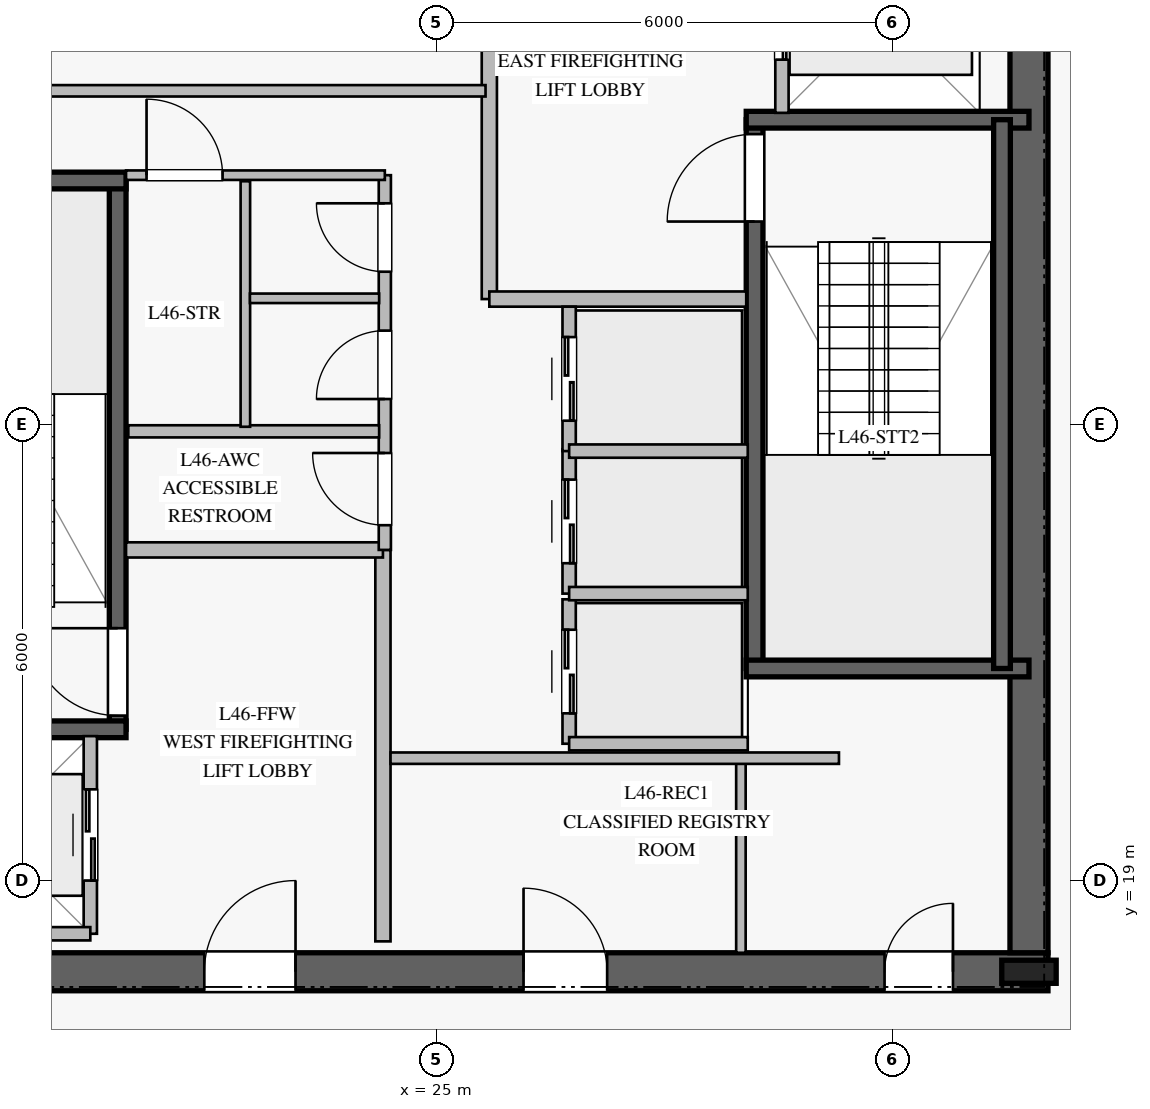
"""IFC4 building model, lengths in metres.
Left out: names, types, materials, properties, quantities, classifications, styles, units other than length and angle.
Written with IfcOpenShell. Run it as: python <this file> out.ifc"""

import sys

from ifc_helpers import new_model, si_unit, direction, frame, frame_2d, origin, origin_2d, place, context, subcontext, project, spatial, rectangle, i_section, extrude, element, fill, save


model = new_model("IFC4")
c1 = context("Model", 3, precision=1e-05, world=origin(), true_north=direction((0.0, 1.0)))
c2 = subcontext(c1, "Body", "Model", "MODEL_VIEW")
j1 = project(units=[si_unit("LENGTHUNIT", "METRE"), si_unit("PLANEANGLEUNIT", "RADIAN")], contexts=[c1])
p1 = place(None, origin())
s1 = spatial("IfcSite", under=j1, at=p1, CompositionType="ELEMENT")
p2 = place(p1, origin())
s2 = spatial("IfcBuilding", under=s1, at=p2, CompositionType="ELEMENT")
p3 = place(p2, frame((0.0, 0.0, 192.8)))
s3 = spatial("IfcBuildingStorey", under=s2, at=p3, CompositionType="ELEMENT", Elevation=192.8)
p4 = place(p3, frame((16.95, 17.8, 0.0), z_axis=(0.0, 0.0, 1.0), x_axis=(1.0, 0.0, 0.0)))
e1 = element("IfcWall", 1, at=p4, inside=s3, PredefinedType="SHEAR", context=c2, shape_type="SweptSolid", body=[
    extrude(rectangle(XDim=16.1, YDim=0.5, at=frame_2d((8.05, 0.0))), origin(), (0.0, 0.0, 1.0), 3.78),
])
p5 = place(p4, frame((5.0, 0.0, 0.0)))
e2 = element("IfcOpeningElement", 2, at=p5, cuts=e1, PredefinedType="OPENING", context=c2, shape_type="SweptSolid", body=[
    extrude(rectangle(XDim=1.2, YDim=2.25, at=frame_2d((0.6, 1.125))), frame((0.0, 0.26, 0.0), z_axis=(0.0, -1.0, 0.0), x_axis=(1.0, 0.0, 0.0)), (0.0, 0.0, 1.0), 0.52),
])
p6 = place(p4, frame((13.95, 0.0, 0.0)))
e3 = element("IfcOpeningElement", 3, at=p6, cuts=e1, PredefinedType="OPENING", context=c2, shape_type="SweptSolid", body=[
    extrude(rectangle(XDim=0.9, YDim=2.1, at=frame_2d((0.45, 1.05))), frame((0.0, 0.26, 0.0), z_axis=(0.0, -1.0, 0.0), x_axis=(1.0, 0.0, 0.0)), (0.0, 0.0, 1.0), 0.52),
])
p7 = place(p4, frame((9.2, 0.0, 0.0)))
e4 = element("IfcOpeningElement", 4, at=p7, cuts=e1, PredefinedType="OPENING", context=c2, shape_type="SweptSolid", body=[
    extrude(rectangle(XDim=1.1, YDim=2.2, at=frame_2d((0.55, 1.1))), frame((0.0, 0.26, 0.0), z_axis=(0.0, -1.0, 0.0), x_axis=(1.0, 0.0, 0.0)), (0.0, 0.0, 1.0), 0.52),
])
p8 = place(p3, frame((32.8, 18.05, 0.0), z_axis=(0.0, 0.0, 1.0), x_axis=(0.0, 1.0, 0.0)))
e5 = element("IfcWall", 5, at=p8, inside=s3, PredefinedType="SHEAR", context=c2, shape_type="SweptSolid", body=[
    extrude(rectangle(XDim=13.9, YDim=0.5, at=frame_2d((6.95, 0.0))), origin(), (0.0, 0.0, 1.0), 3.78),
])
p9 = place(p3, frame((32.8, 17.8, 0.0), z_axis=(0.0, 0.0, 1.0), x_axis=(1.0, 0.0, 0.0)))
e6 = element("IfcColumn", 6, at=p9, inside=s3, PredefinedType="COLUMN", context=c2, shape_type="SweptSolid", body=[
    extrude(i_section(OverallWidth=0.304, OverallDepth=0.716, WebThickness=0.021, FlangeThickness=0.04, at=origin_2d()), origin(), (0.0, 0.0, 1.0), 4.0),
])
p10 = place(p3, frame((20.81, 20.99, 0.0), z_axis=(0.0, 0.0, 1.0), x_axis=(0.0, 1.0, 0.0)))
e7 = element("IfcWall", 7, at=p10, inside=s3, PredefinedType="SOLIDWALL", context=c2, shape_type="SweptSolid", body=[
    extrude(rectangle(XDim=7.22, YDim=0.22, at=frame_2d((3.61, 0.0))), origin(), (0.0, 0.0, 1.0), 3.78),
])
p11 = place(p10, frame((0.18, 0.0, 0.0)))
e8 = element("IfcOpeningElement", 8, at=p11, cuts=e7, PredefinedType="OPENING", context=c2, shape_type="SweptSolid", body=[
    extrude(rectangle(XDim=1.15, YDim=2.2, at=frame_2d((0.575, 1.1))), frame((0.0, 0.12, 0.0), z_axis=(0.0, -1.0, 0.0), x_axis=(1.0, 0.0, 0.0)), (0.0, 0.0, 1.0), 0.24),
])
for number, where, z_axis, x_axis in (
    (9, (17.2, 20.99, 0.0), (0.0, 0.0, 1.0), (1.0, 0.0, 0.0)),
    (10, (17.2, 28.21, 0.0), (0.0, 0.0, 1.0), (1.0, 0.0, 0.0)),
):
    element("IfcWall", number, at=place(p3, frame(where, z_axis=z_axis, x_axis=x_axis)), inside=s3, PredefinedType="SOLIDWALL", context=c2, shape_type="SweptSolid", body=[
        extrude(rectangle(XDim=3.72, YDim=0.22, at=frame_2d((1.86, 0.0))), origin(), (0.0, 0.0, 1.0), 3.78),
    ])
p12 = place(p3, frame((29.19, 21.79, 0.0), z_axis=(0.0, 0.0, 1.0), x_axis=(0.0, 1.0, 0.0)))
e11 = element("IfcWall", 11, at=p12, inside=s3, PredefinedType="SOLIDWALL", context=c2, shape_type="SweptSolid", body=[
    extrude(rectangle(XDim=7.22, YDim=0.22, at=frame_2d((3.61, 0.0))), origin(), (0.0, 0.0, 1.0), 3.78),
])
p13 = place(p12, frame((5.88, 0.0, 0.0)))
e12 = element("IfcOpeningElement", 12, at=p13, cuts=e11, PredefinedType="OPENING", context=c2, shape_type="SweptSolid", body=[
    extrude(rectangle(XDim=1.15, YDim=2.2, at=frame_2d((0.575, 1.1))), frame((0.0, 0.12, 0.0), z_axis=(0.0, -1.0, 0.0), x_axis=(1.0, 0.0, 0.0)), (0.0, 0.0, 1.0), 0.24),
])
for number, where, z_axis, x_axis in (
    (13, (29.08, 21.79, 0.0), (0.0, 0.0, 1.0), (1.0, 0.0, 0.0)),
    (14, (29.08, 29.01, 0.0), (0.0, 0.0, 1.0), (1.0, 0.0, 0.0)),
):
    element("IfcWall", number, at=place(p3, frame(where, z_axis=z_axis, x_axis=x_axis)), inside=s3, PredefinedType="SOLIDWALL", context=c2, shape_type="SweptSolid", body=[
        extrude(rectangle(XDim=3.72, YDim=0.22, at=frame_2d((1.86, 0.0))), origin(), (0.0, 0.0, 1.0), 3.78),
    ])
p14 = place(p3, frame((32.445, 29.01, 0.0), z_axis=(0.0, 0.0, 1.0), x_axis=(0.0, -1.0, 0.0)))
e15 = element("IfcWall", 15, at=p14, inside=s3, PredefinedType="SOLIDWALL", context=c2, shape_type="SweptSolid", body=[
    extrude(rectangle(XDim=7.22, YDim=0.22, at=frame_2d((3.61, 0.0))), origin(), (0.0, 0.0, 1.0), 3.78),
])
p15 = place(p3, frame((24.3, 18.2, 0.0), z_axis=(0.0, 0.0, 1.0), x_axis=(0.0, 1.0, 0.0)))
e16 = element("IfcWall", 16, at=p15, inside=s3, PredefinedType="PARTITIONING", context=c2, shape_type="SweptSolid", body=[
    extrude(rectangle(XDim=5.15, YDim=0.2, at=frame_2d((2.575, 0.0))), origin(), (0.0, 0.0, 1.0), 3.78),
])
p16 = place(p3, frame((20.92, 23.35, 0.0), z_axis=(0.0, 0.0, 1.0), x_axis=(1.0, 0.0, 0.0)))
e17 = element("IfcWall", 17, at=p16, inside=s3, PredefinedType="PARTITIONING", context=c2, shape_type="SweptSolid", body=[
    extrude(rectangle(XDim=3.38, YDim=0.2, at=frame_2d((1.69, 0.0))), origin(), (0.0, 0.0, 1.0), 3.78),
])
p17 = place(p3, frame((25.7, 26.65, 0.0), z_axis=(0.0, 0.0, 1.0), x_axis=(0.0, 1.0, 0.0)))
e18 = element("IfcWall", 18, at=p17, inside=s3, PredefinedType="PARTITIONING", context=c2, shape_type="SweptSolid", body=[
    extrude(rectangle(XDim=5.15, YDim=0.2, at=frame_2d((2.575, 0.0))), origin(), (0.0, 0.0, 1.0), 3.78),
])
p18 = place(p3, frame((25.7, 26.65, 0.0), z_axis=(0.0, 0.0, 1.0), x_axis=(1.0, 0.0, 0.0)))
e19 = element("IfcWall", 19, at=p18, inside=s3, PredefinedType="PARTITIONING", context=c2, shape_type="SweptSolid", body=[
    extrude(rectangle(XDim=3.38, YDim=0.2, at=frame_2d((1.69, 0.0))), origin(), (0.0, 0.0, 1.0), 3.78),
])
p19 = place(p3, frame((24.325, 23.35, 0.0), z_axis=(0.0, 0.0, 1.0), x_axis=(0.0, 1.0, 0.0)))
e20 = element("IfcWall", 20, at=p19, inside=s3, PredefinedType="PLUMBINGWALL", context=c2, shape_type="SweptSolid", body=[
    extrude(rectangle(XDim=4.93, YDim=0.16, at=frame_2d((2.465, 0.0))), origin(), (0.0, 0.0, 1.0), 3.78),
])
p20 = place(p19, frame((0.325, 0.0, 0.0)))
e21 = element("IfcOpeningElement", 21, at=p20, cuts=e20, PredefinedType="OPENING", context=c2, shape_type="SweptSolid", body=[
    extrude(rectangle(XDim=0.95, YDim=2.1, at=frame_2d((0.475, 1.05))), frame((0.0, 0.09, 0.0), z_axis=(0.0, -1.0, 0.0), x_axis=(1.0, 0.0, 0.0)), (0.0, 0.0, 1.0), 0.18),
])
p21 = place(p19, frame((1.985, 0.0, 0.0)))
e22 = element("IfcOpeningElement", 22, at=p21, cuts=e20, PredefinedType="OPENING", context=c2, shape_type="SweptSolid", body=[
    extrude(rectangle(XDim=0.9, YDim=2.1, at=frame_2d((0.45, 1.05))), frame((0.0, 0.09, 0.0), z_axis=(0.0, -1.0, 0.0), x_axis=(1.0, 0.0, 0.0)), (0.0, 0.0, 1.0), 0.18),
])
p22 = place(p19, frame((3.66, 0.0, 0.0)))
e23 = element("IfcOpeningElement", 23, at=p22, cuts=e20, PredefinedType="OPENING", context=c2, shape_type="SweptSolid", body=[
    extrude(rectangle(XDim=0.9, YDim=2.1, at=frame_2d((0.45, 1.05))), frame((0.0, 0.09, 0.0), z_axis=(0.0, -1.0, 0.0), x_axis=(1.0, 0.0, 0.0)), (0.0, 0.0, 1.0), 0.18),
])
p23 = place(p3, frame((20.92, 28.28, 0.0), z_axis=(0.0, 0.0, 1.0), x_axis=(1.0, 0.0, 0.0)))
e24 = element("IfcWall", 24, at=p23, inside=s3, PredefinedType="PARTITIONING", context=c2, shape_type="SweptSolid", body=[
    extrude(rectangle(XDim=3.405, YDim=0.125, at=frame_2d((1.703, 0.0))), origin(), (0.0, 0.0, 1.0), 3.78),
])
p24 = place(p23, frame((0.27, 0.0, 0.0)))
e25 = element("IfcOpeningElement", 25, at=p24, cuts=e24, PredefinedType="OPENING", context=c2, shape_type="SweptSolid", body=[
    extrude(rectangle(XDim=1.0, YDim=2.15, at=frame_2d((0.5, 1.075))), frame((0.0, 0.073, 0.0), z_axis=(0.0, -1.0, 0.0), x_axis=(1.0, 0.0, 0.0)), (0.0, 0.0, 1.0), 0.145),
])
p25 = place(p3, frame((29.01, 18.05, 0.0), z_axis=(0.0, 0.0, 1.0), x_axis=(0.0, 1.0, 0.0)))
e26 = element("IfcWall", 26, at=p25, inside=s3, PredefinedType="PARTITIONING", context=c2, shape_type="SweptSolid", body=[
    extrude(rectangle(XDim=2.5, YDim=0.125, at=frame_2d((1.25, 0.0))), origin(), (0.0, 0.0, 1.0), 3.78),
])
p26 = place(p3, frame((20.95, 24.91, 0.0), z_axis=(0.0, 0.0, 1.0), x_axis=(1.0, 0.0, 0.0)))
e27 = element("IfcWall", 27, at=p26, inside=s3, PredefinedType="PLUMBINGWALL", context=c2, shape_type="SweptSolid", body=[
    extrude(rectangle(XDim=3.3, YDim=0.16, at=frame_2d((1.65, 0.0))), origin(), (0.0, 0.0, 1.0), 3.78),
])
p27 = place(p3, frame((22.49, 24.97, 0.0), z_axis=(0.0, 0.0, 1.0), x_axis=(0.0, 1.0, 0.0)))
e28 = element("IfcWall", 28, at=p27, inside=s3, PredefinedType="PARTITIONING", context=c2, shape_type="SweptSolid", body=[
    extrude(rectangle(XDim=3.23, YDim=0.125, at=frame_2d((1.615, 0.0))), origin(), (0.0, 0.0, 1.0), 3.78),
])
p28 = place(p3, frame((22.55, 26.66, 0.0), z_axis=(0.0, 0.0, 1.0), x_axis=(1.0, 0.0, 0.0)))
e29 = element("IfcWall", 29, at=p28, inside=s3, PredefinedType="PARTITIONING", context=c2, shape_type="SweptSolid", body=[
    extrude(rectangle(XDim=1.7, YDim=0.125, at=frame_2d((0.85, 0.0))), origin(), (0.0, 0.0, 1.0), 3.78),
])
p29 = place(p3, frame((24.4, 20.61, 0.0), z_axis=(0.0, 0.0, 1.0), x_axis=(1.0, 0.0, 0.0)))
e30 = element("IfcWall", 30, at=p29, inside=s3, PredefinedType="PARTITIONING", context=c2, shape_type="SweptSolid", body=[
    extrude(rectangle(XDim=5.9, YDim=0.15, at=frame_2d((2.95, 0.0))), origin(), (0.0, 0.0, 1.0), 3.78),
])
p30 = place(p3, frame((19.75, 29.39, 0.0), z_axis=(0.0, 0.0, 1.0), x_axis=(1.0, 0.0, 0.0)))
e31 = element("IfcWall", 31, at=p30, inside=s3, PredefinedType="PARTITIONING", context=c2, shape_type="SweptSolid", body=[
    extrude(rectangle(XDim=5.9, YDim=0.15, at=frame_2d((2.95, 0.0))), origin(), (0.0, 0.0, 1.0), 3.78),
])
p31 = place(p3, frame((26.75, 20.8, 0.0), z_axis=(0.0, 0.0, 1.0), x_axis=(0.0, 1.0, 0.0)))
e32 = element("IfcWall", 32, at=p31, inside=s3, PredefinedType="PARTITIONING", context=c2, shape_type="SweptSolid", body=[
    extrude(rectangle(XDim=1.9, YDim=0.175, at=frame_2d((0.95, 0.0))), origin(), (0.0, 0.0, 1.0), 3.78),
])
p32 = place(p31, frame((0.4, 0.0, 0.0)))
e33 = element("IfcOpeningElement", 33, at=p32, cuts=e32, PredefinedType="OPENING", context=c2, shape_type="SweptSolid", body=[
    extrude(rectangle(XDim=1.1, YDim=2.2, at=frame_2d((0.55, 1.1))), frame((0.0, 0.098, 0.0), z_axis=(0.0, -1.0, 0.0), x_axis=(1.0, 0.0, 0.0)), (0.0, 0.0, 1.0), 0.195),
])
p33 = place(p3, frame((26.75, 20.8, 0.0), z_axis=(0.0, 0.0, 1.0), x_axis=(1.0, 0.0, 0.0)))
e34 = element("IfcWall", 34, at=p33, inside=s3, PredefinedType="PARTITIONING", context=c2, shape_type="SweptSolid", body=[
    extrude(rectangle(XDim=2.35, YDim=0.175, at=frame_2d((1.175, 0.0))), origin(), (0.0, 0.0, 1.0), 3.78),
])
p34 = place(p3, frame((26.75, 22.775, 0.0), z_axis=(0.0, 0.0, 1.0), x_axis=(0.0, 1.0, 0.0)))
e35 = element("IfcWall", 35, at=p34, inside=s3, PredefinedType="PARTITIONING", context=c2, shape_type="SweptSolid", body=[
    extrude(rectangle(XDim=1.9, YDim=0.175, at=frame_2d((0.95, 0.0))), origin(), (0.0, 0.0, 1.0), 3.78),
])
p35 = place(p34, frame((0.4, 0.0, 0.0)))
e36 = element("IfcOpeningElement", 36, at=p35, cuts=e35, PredefinedType="OPENING", context=c2, shape_type="SweptSolid", body=[
    extrude(rectangle(XDim=1.1, YDim=2.2, at=frame_2d((0.55, 1.1))), frame((0.0, 0.098, 0.0), z_axis=(0.0, -1.0, 0.0), x_axis=(1.0, 0.0, 0.0)), (0.0, 0.0, 1.0), 0.195),
])
p36 = place(p3, frame((26.75, 22.775, 0.0), z_axis=(0.0, 0.0, 1.0), x_axis=(1.0, 0.0, 0.0)))
e37 = element("IfcWall", 37, at=p36, inside=s3, PredefinedType="PARTITIONING", context=c2, shape_type="SweptSolid", body=[
    extrude(rectangle(XDim=2.35, YDim=0.175, at=frame_2d((1.175, 0.0))), origin(), (0.0, 0.0, 1.0), 3.78),
])
p37 = place(p3, frame((26.75, 24.65, 0.0), z_axis=(0.0, 0.0, 1.0), x_axis=(0.0, 1.0, 0.0)))
e38 = element("IfcWall", 38, at=p37, inside=s3, PredefinedType="PARTITIONING", context=c2, shape_type="SweptSolid", body=[
    extrude(rectangle(XDim=1.9, YDim=0.175, at=frame_2d((0.95, 0.0))), origin(), (0.0, 0.0, 1.0), 3.78),
])
p38 = place(p37, frame((0.4, 0.0, 0.0)))
e39 = element("IfcOpeningElement", 39, at=p38, cuts=e38, PredefinedType="OPENING", context=c2, shape_type="SweptSolid", body=[
    extrude(rectangle(XDim=1.1, YDim=2.2, at=frame_2d((0.55, 1.1))), frame((0.0, 0.098, 0.0), z_axis=(0.0, -1.0, 0.0), x_axis=(1.0, 0.0, 0.0)), (0.0, 0.0, 1.0), 0.195),
])
p39 = place(p3, frame((26.75, 24.65, 0.0), z_axis=(0.0, 0.0, 1.0), x_axis=(1.0, 0.0, 0.0)))
e40 = element("IfcWall", 40, at=p39, inside=s3, PredefinedType="PARTITIONING", context=c2, shape_type="SweptSolid", body=[
    extrude(rectangle(XDim=2.35, YDim=0.175, at=frame_2d((1.175, 0.0))), origin(), (0.0, 0.0, 1.0), 3.78),
])
p40 = place(p3, frame((20.45, 18.3, 0.0), z_axis=(0.0, 0.0, 1.0), x_axis=(0.0, 1.0, 0.0)))
e41 = element("IfcWall", 41, at=p40, inside=s3, PredefinedType="PARTITIONING", context=c2, shape_type="SweptSolid", body=[
    extrude(rectangle(XDim=2.6, YDim=0.175, at=frame_2d((1.3, 0.0))), origin(), (0.0, 0.0, 1.0), 3.78),
])
p41 = place(p40, frame((0.7, 0.0, 0.0)))
e42 = element("IfcOpeningElement", 42, at=p41, cuts=e41, PredefinedType="OPENING", context=c2, shape_type="SweptSolid", body=[
    extrude(rectangle(XDim=1.2, YDim=2.2, at=frame_2d((0.6, 1.1))), frame((0.0, 0.098, 0.0), z_axis=(0.0, -1.0, 0.0), x_axis=(1.0, 0.0, 0.0)), (0.0, 0.0, 1.0), 0.195),
])
p42 = place(p3, frame((17.85, 18.3, 0.0), z_axis=(0.0, 0.0, 1.0), x_axis=(1.0, 0.0, 0.0)))
e43 = element("IfcWall", 43, at=p42, inside=s3, PredefinedType="PARTITIONING", context=c2, shape_type="SweptSolid", body=[
    extrude(rectangle(XDim=2.6, YDim=0.175, at=frame_2d((1.3, 0.0))), origin(), (0.0, 0.0, 1.0), 3.78),
])
p43 = place(p3, frame((29.55, 29.1, 0.0), z_axis=(0.0, 0.0, 1.0), x_axis=(0.0, 1.0, 0.0)))
e44 = element("IfcWall", 44, at=p43, inside=s3, PredefinedType="PARTITIONING", context=c2, shape_type="SweptSolid", body=[
    extrude(rectangle(XDim=2.6, YDim=0.175, at=frame_2d((1.3, 0.0))), origin(), (0.0, 0.0, 1.0), 3.78),
])
p44 = place(p43, frame((0.7, 0.0, 0.0)))
e45 = element("IfcOpeningElement", 45, at=p44, cuts=e44, PredefinedType="OPENING", context=c2, shape_type="SweptSolid", body=[
    extrude(rectangle(XDim=1.2, YDim=2.2, at=frame_2d((0.6, 1.1))), frame((0.0, 0.098, 0.0), z_axis=(0.0, -1.0, 0.0), x_axis=(1.0, 0.0, 0.0)), (0.0, 0.0, 1.0), 0.195),
])
p45 = place(p11, origin())
e46 = element("IfcDoor", 46, at=p45, inside=s3, OperationType="SINGLE_SWING_RIGHT", PredefinedType="DOOR", context=c2, shape_type="SweptSolid", body=[
    extrude(rectangle(XDim=1.15, YDim=2.2, at=frame_2d((0.575, 1.1))), frame((0.0, 0.025, 0.0), z_axis=(0.0, -1.0, 0.0), x_axis=(1.0, 0.0, 0.0)), (0.0, 0.0, 1.0), 0.05),
])
fill(e8, e46)
p46 = place(p13, origin())
e47 = element("IfcDoor", 47, at=p46, inside=s3, OperationType="SINGLE_SWING_LEFT", PredefinedType="DOOR", context=c2, shape_type="SweptSolid", body=[
    extrude(rectangle(XDim=1.15, YDim=2.2, at=frame_2d((0.575, 1.1))), frame((0.0, 0.025, 0.0), z_axis=(0.0, -1.0, 0.0), x_axis=(1.0, 0.0, 0.0)), (0.0, 0.0, 1.0), 0.05),
])
fill(e12, e47)
p47 = place(p5, origin())
e48 = element("IfcDoor", 48, at=p47, inside=s3, OperationType="SINGLE_SWING_RIGHT", PredefinedType="DOOR", context=c2, shape_type="SweptSolid", body=[
    extrude(rectangle(XDim=1.2, YDim=2.25, at=frame_2d((0.6, 1.125))), frame((0.0, 0.025, 0.0), z_axis=(0.0, -1.0, 0.0), x_axis=(1.0, 0.0, 0.0)), (0.0, 0.0, 1.0), 0.05),
])
fill(e2, e48)
p48 = place(p20, origin())
e49 = element("IfcDoor", 49, at=p48, inside=s3, OperationType="SINGLE_SWING_RIGHT", PredefinedType="DOOR", context=c2, shape_type="SweptSolid", body=[
    extrude(rectangle(XDim=0.95, YDim=2.1, at=frame_2d((0.475, 1.05))), frame((0.0, 0.025, 0.0), z_axis=(0.0, -1.0, 0.0), x_axis=(1.0, 0.0, 0.0)), (0.0, 0.0, 1.0), 0.05),
])
fill(e21, e49)
p49 = place(p21, origin())
e50 = element("IfcDoor", 50, at=p49, inside=s3, OperationType="SINGLE_SWING_LEFT", PredefinedType="DOOR", context=c2, shape_type="SweptSolid", body=[
    extrude(rectangle(XDim=0.9, YDim=2.1, at=frame_2d((0.45, 1.05))), frame((0.0, 0.025, 0.0), z_axis=(0.0, -1.0, 0.0), x_axis=(1.0, 0.0, 0.0)), (0.0, 0.0, 1.0), 0.05),
])
fill(e22, e50)
p50 = place(p22, origin())
e51 = element("IfcDoor", 51, at=p50, inside=s3, OperationType="SINGLE_SWING_RIGHT", PredefinedType="DOOR", context=c2, shape_type="SweptSolid", body=[
    extrude(rectangle(XDim=0.9, YDim=2.1, at=frame_2d((0.45, 1.05))), frame((0.0, 0.025, 0.0), z_axis=(0.0, -1.0, 0.0), x_axis=(1.0, 0.0, 0.0)), (0.0, 0.0, 1.0), 0.05),
])
fill(e23, e51)
p51 = place(p24, origin())
e52 = element("IfcDoor", 52, at=p51, inside=s3, OperationType="SINGLE_SWING_LEFT", PredefinedType="DOOR", context=c2, shape_type="SweptSolid", body=[
    extrude(rectangle(XDim=1.0, YDim=2.15, at=frame_2d((0.5, 1.075))), frame((0.0, 0.025, 0.0), z_axis=(0.0, -1.0, 0.0), x_axis=(1.0, 0.0, 0.0)), (0.0, 0.0, 1.0), 0.05),
])
fill(e25, e52)
p52 = place(p6, origin())
e53 = element("IfcDoor", 53, at=p52, inside=s3, OperationType="SINGLE_SWING_RIGHT", PredefinedType="DOOR", context=c2, shape_type="SweptSolid", body=[
    extrude(rectangle(XDim=0.9, YDim=2.1, at=frame_2d((0.45, 1.05))), frame((0.0, 0.025, 0.0), z_axis=(0.0, -1.0, 0.0), x_axis=(1.0, 0.0, 0.0)), (0.0, 0.0, 1.0), 0.05),
])
fill(e3, e53)
p53 = place(p7, origin())
e54 = element("IfcDoor", 54, at=p53, inside=s3, OperationType="SINGLE_SWING_LEFT", PredefinedType="DOOR", context=c2, shape_type="SweptSolid", body=[
    extrude(rectangle(XDim=1.1, YDim=2.2, at=frame_2d((0.55, 1.1))), frame((0.0, 0.025, 0.0), z_axis=(0.0, -1.0, 0.0), x_axis=(1.0, 0.0, 0.0)), (0.0, 0.0, 1.0), 0.05),
])
fill(e4, e54)
p54 = place(p32, origin())
e55 = element("IfcDoor", 55, at=p54, inside=s3, OperationType="DOUBLE_DOOR_SLIDING", PredefinedType="DOOR", context=c2, shape_type="SweptSolid", body=[
    extrude(rectangle(XDim=1.1, YDim=2.2, at=frame_2d((0.55, 1.1))), frame((0.0, 0.025, 0.0), z_axis=(0.0, -1.0, 0.0), x_axis=(1.0, 0.0, 0.0)), (0.0, 0.0, 1.0), 0.05),
])
fill(e33, e55)
p55 = place(p35, origin())
e56 = element("IfcDoor", 56, at=p55, inside=s3, OperationType="DOUBLE_DOOR_SLIDING", PredefinedType="DOOR", context=c2, shape_type="SweptSolid", body=[
    extrude(rectangle(XDim=1.1, YDim=2.2, at=frame_2d((0.55, 1.1))), frame((0.0, 0.025, 0.0), z_axis=(0.0, -1.0, 0.0), x_axis=(1.0, 0.0, 0.0)), (0.0, 0.0, 1.0), 0.05),
])
fill(e36, e56)
p56 = place(p38, origin())
e57 = element("IfcDoor", 57, at=p56, inside=s3, OperationType="DOUBLE_DOOR_SLIDING", PredefinedType="DOOR", context=c2, shape_type="SweptSolid", body=[
    extrude(rectangle(XDim=1.1, YDim=2.2, at=frame_2d((0.55, 1.1))), frame((0.0, 0.025, 0.0), z_axis=(0.0, -1.0, 0.0), x_axis=(1.0, 0.0, 0.0)), (0.0, 0.0, 1.0), 0.05),
])
fill(e39, e57)
p57 = place(p41, origin())
e58 = element("IfcDoor", 58, at=p57, inside=s3, OperationType="DOUBLE_DOOR_SLIDING", PredefinedType="DOOR", context=c2, shape_type="SweptSolid", body=[
    extrude(rectangle(XDim=1.2, YDim=2.2, at=frame_2d((0.6, 1.1))), frame((0.0, 0.025, 0.0), z_axis=(0.0, -1.0, 0.0), x_axis=(1.0, 0.0, 0.0)), (0.0, 0.0, 1.0), 0.05),
])
fill(e42, e58)
p58 = place(p44, origin())
e59 = element("IfcDoor", 59, at=p58, inside=s3, OperationType="DOUBLE_DOOR_SLIDING", PredefinedType="DOOR", context=c2, shape_type="SweptSolid", body=[
    extrude(rectangle(XDim=1.2, YDim=2.2, at=frame_2d((0.6, 1.1))), frame((0.0, 0.025, 0.0), z_axis=(0.0, -1.0, 0.0), x_axis=(1.0, 0.0, 0.0)), (0.0, 0.0, 1.0), 0.05),
])
fill(e45, e59)
save(model, sys.argv[1])
